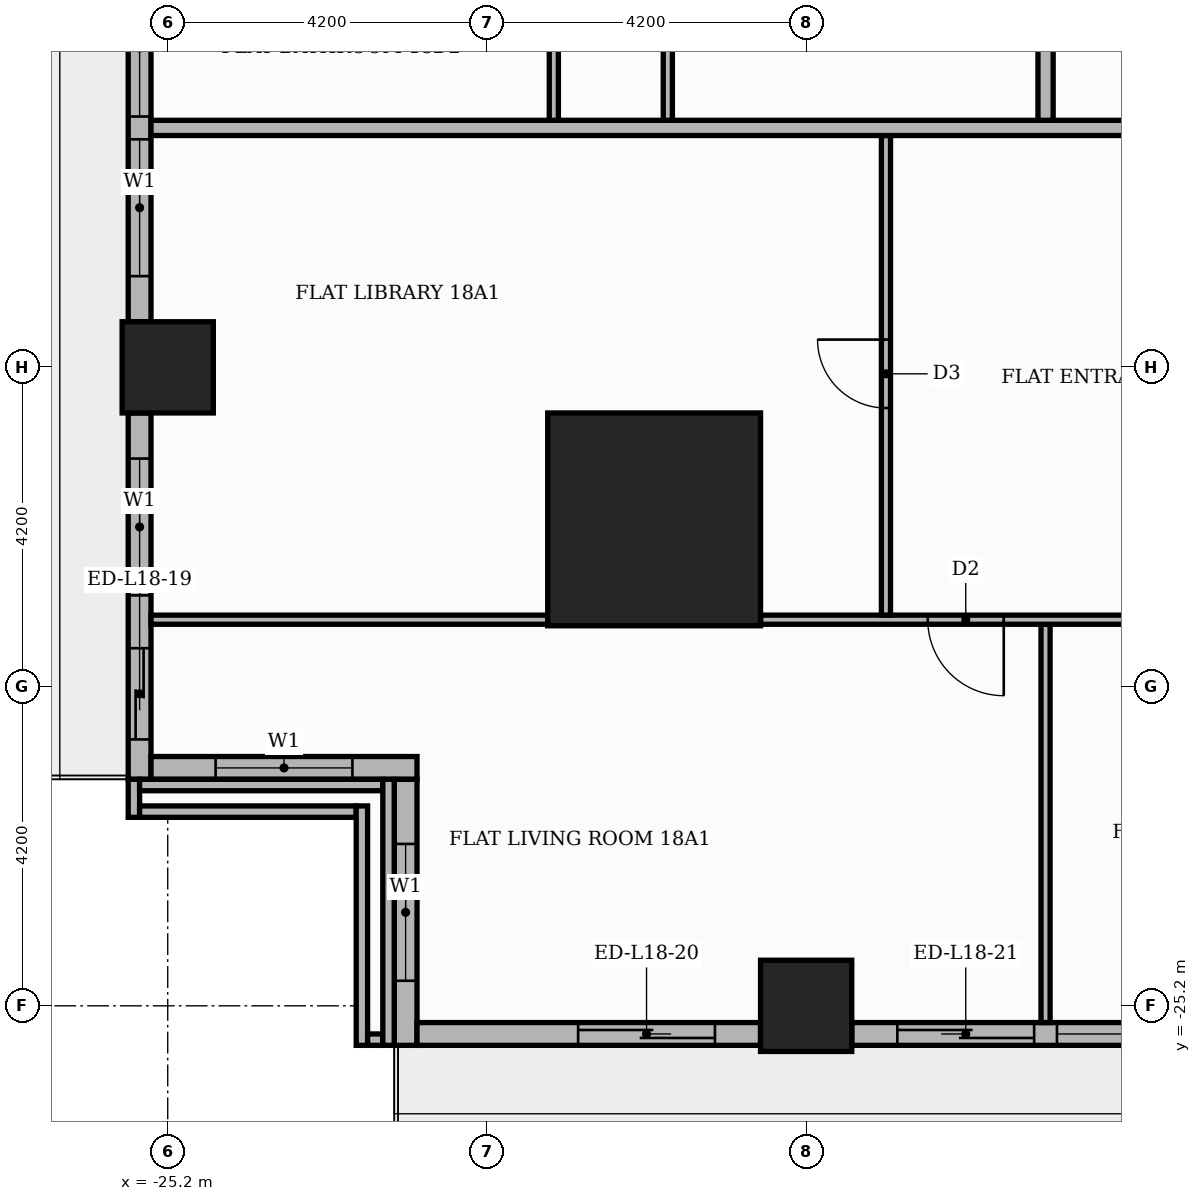
"""IFC4 building model, lengths in metres.
Left out: names, types, materials, properties, quantities, classifications, styles, units other than length and angle.
Written with IfcOpenShell. Run it as: python <this file> out.ifc"""

import sys

from ifc_helpers import new_model, si_unit, direction, frame, frame_2d, origin, origin_2d, place, context, subcontext, project, spatial, rectangle, extrude, element, fill, save


model = new_model("IFC4")
c1 = context("Model", 3, precision=1e-05, world=origin(), true_north=direction((0.0, 1.0)))
c2 = subcontext(c1, "Body", "Model", "MODEL_VIEW")
j1 = project(units=[si_unit("LENGTHUNIT", "METRE"), si_unit("PLANEANGLEUNIT", "RADIAN")], contexts=[c1])
p1 = place(None, origin())
s1 = spatial("IfcSite", under=j1, at=p1, CompositionType="ELEMENT")
p2 = place(p1, origin())
s2 = spatial("IfcBuilding", under=s1, at=p2, CompositionType="ELEMENT")
p3 = place(p2, frame((0.0, 0.0, 79.2)))
s3 = spatial("IfcBuildingStorey", under=s2, at=p3, CompositionType="ELEMENT", Elevation=79.2)
p4 = place(p3, frame((-18.8, -18.8, 0.0), z_axis=(0.0, 0.0, 1.0), x_axis=(1.0, 0.0, 0.0)))
e1 = element("IfcColumn", 1, at=p4, inside=s3, PredefinedType="COLUMN", context=c2, shape_type="SweptSolid", body=[
    extrude(rectangle(XDim=2.8, YDim=2.8, at=origin_2d()), origin(), (0.0, 0.0, 1.0), 3.9),
])
for number, where, z_axis, x_axis in (
    (2, (-16.8, -25.2, 0.0), (0.0, 0.0, 1.0), (1.0, 0.0, 0.0)),
    (3, (-25.2, -16.8, 0.0), (0.0, 0.0, 1.0), (1.0, 0.0, 0.0)),
):
    element("IfcColumn", number, at=place(p3, frame(where, z_axis=z_axis, x_axis=x_axis)), inside=s3, PredefinedType="COLUMN", context=c2, shape_type="SweptSolid", body=[
        extrude(rectangle(XDim=1.2, YDim=1.2, at=origin_2d()), origin(), (0.0, 0.0, 1.0), 3.9),
    ])
p5 = place(p3, frame((-25.57, -9.0, 0.0), z_axis=(0.0, 0.0, 1.0), x_axis=(0.0, -1.0, 0.0)))
e4 = element("IfcWall", 4, at=p5, inside=s3, PredefinedType="STANDARD", context=c2, shape_type="SweptSolid", body=[
    extrude(rectangle(XDim=7.2, YDim=0.3, at=frame_2d((3.6, 0.0))), origin(), (0.0, 0.0, 1.0), 3.48),
])
p6 = place(p5, frame((0.6, 0.0, 0.9)))
e5 = element("IfcOpeningElement", 5, at=p6, cuts=e4, PredefinedType="OPENING", context=c2, shape_type="SweptSolid", body=[
    extrude(rectangle(XDim=1.8, YDim=2.1, at=frame_2d((0.9, 1.05))), frame((0.0, 0.16, 0.0), z_axis=(0.0, -1.0, 0.0), x_axis=(1.0, 0.0, 0.0)), (0.0, 0.0, 1.0), 0.32),
])
p7 = place(p5, frame((2.7, 0.0, 0.9)))
e6 = element("IfcOpeningElement", 6, at=p7, cuts=e4, PredefinedType="OPENING", context=c2, shape_type="SweptSolid", body=[
    extrude(rectangle(XDim=1.8, YDim=2.1, at=frame_2d((0.9, 1.05))), frame((0.0, 0.16, 0.0), z_axis=(0.0, -1.0, 0.0), x_axis=(1.0, 0.0, 0.0)), (0.0, 0.0, 1.0), 0.32),
])
p8 = place(p5, frame((4.8, 0.0, 0.9)))
e7 = element("IfcOpeningElement", 7, at=p8, cuts=e4, PredefinedType="OPENING", context=c2, shape_type="SweptSolid", body=[
    extrude(rectangle(XDim=1.8, YDim=2.1, at=frame_2d((0.9, 1.05))), frame((0.0, 0.16, 0.0), z_axis=(0.0, -1.0, 0.0), x_axis=(1.0, 0.0, 0.0)), (0.0, 0.0, 1.0), 0.32),
])
p9 = place(p3, frame((-25.57, -17.4, 0.0), z_axis=(0.0, 0.0, 1.0), x_axis=(0.0, -1.0, 0.0)))
e8 = element("IfcWall", 8, at=p9, inside=s3, PredefinedType="STANDARD", context=c2, shape_type="SweptSolid", body=[
    extrude(rectangle(XDim=4.82, YDim=0.3, at=frame_2d((2.41, 0.0))), origin(), (0.0, 0.0, 1.0), 3.48),
])
p10 = place(p9, frame((0.6, 0.0, 0.9)))
e9 = element("IfcOpeningElement", 9, at=p10, cuts=e8, PredefinedType="OPENING", context=c2, shape_type="SweptSolid", body=[
    extrude(rectangle(XDim=1.8, YDim=2.1, at=frame_2d((0.9, 1.05))), frame((0.0, 0.16, 0.0), z_axis=(0.0, -1.0, 0.0), x_axis=(1.0, 0.0, 0.0)), (0.0, 0.0, 1.0), 0.32),
])
p11 = place(p9, frame((3.095, 0.0, 0.0)))
e10 = element("IfcOpeningElement", 10, at=p11, cuts=e8, PredefinedType="OPENING", context=c2, shape_type="SweptSolid", body=[
    extrude(rectangle(XDim=1.2, YDim=2.4, at=frame_2d((0.6, 1.2))), frame((0.0, 0.16, 0.0), z_axis=(0.0, -1.0, 0.0), x_axis=(1.0, 0.0, 0.0)), (0.0, 0.0, 1.0), 0.32),
])
p12 = place(p3, frame((-25.42, -22.07, 0.0), z_axis=(0.0, 0.0, 1.0), x_axis=(1.0, 0.0, 0.0)))
e11 = element("IfcWall", 11, at=p12, inside=s3, PredefinedType="STANDARD", context=c2, shape_type="SweptSolid", body=[
    extrude(rectangle(XDim=3.5, YDim=0.3, at=frame_2d((1.75, 0.0))), origin(), (0.0, 0.0, 1.0), 3.48),
])
p13 = place(p12, frame((0.85, 0.0, 0.9)))
e12 = element("IfcOpeningElement", 12, at=p13, cuts=e11, PredefinedType="OPENING", context=c2, shape_type="SweptSolid", body=[
    extrude(rectangle(XDim=1.8, YDim=2.1, at=frame_2d((0.9, 1.05))), frame((0.0, 0.16, 0.0), z_axis=(0.0, -1.0, 0.0), x_axis=(1.0, 0.0, 0.0)), (0.0, 0.0, 1.0), 0.32),
])
p14 = place(p3, frame((-22.07, -22.22, 0.0), z_axis=(0.0, 0.0, 1.0), x_axis=(0.0, -1.0, 0.0)))
e13 = element("IfcWall", 13, at=p14, inside=s3, PredefinedType="STANDARD", context=c2, shape_type="SweptSolid", body=[
    extrude(rectangle(XDim=3.5, YDim=0.3, at=frame_2d((1.75, 0.0))), origin(), (0.0, 0.0, 1.0), 3.48),
])
p15 = place(p14, frame((0.85, 0.0, 0.9)))
e14 = element("IfcOpeningElement", 14, at=p15, cuts=e13, PredefinedType="OPENING", context=c2, shape_type="SweptSolid", body=[
    extrude(rectangle(XDim=1.8, YDim=2.1, at=frame_2d((0.9, 1.05))), frame((0.0, 0.16, 0.0), z_axis=(0.0, -1.0, 0.0), x_axis=(1.0, 0.0, 0.0)), (0.0, 0.0, 1.0), 0.32),
])
p16 = place(p3, frame((-21.92, -25.57, 0.0), z_axis=(0.0, 0.0, 1.0), x_axis=(1.0, 0.0, 0.0)))
e15 = element("IfcWall", 15, at=p16, inside=s3, PredefinedType="STANDARD", context=c2, shape_type="SweptSolid", body=[
    extrude(rectangle(XDim=4.52, YDim=0.3, at=frame_2d((2.26, 0.0))), origin(), (0.0, 0.0, 1.0), 3.48),
])
p17 = place(p16, frame((2.12, 0.0, 0.0)))
e16 = element("IfcOpeningElement", 16, at=p17, cuts=e15, PredefinedType="OPENING", context=c2, shape_type="SweptSolid", body=[
    extrude(rectangle(XDim=1.8, YDim=2.4, at=frame_2d((0.9, 1.2))), frame((0.0, 0.16, 0.0), z_axis=(0.0, -1.0, 0.0), x_axis=(1.0, 0.0, 0.0)), (0.0, 0.0, 1.0), 0.32),
])
p18 = place(p3, frame((-16.2, -25.57, 0.0), z_axis=(0.0, 0.0, 1.0), x_axis=(1.0, 0.0, 0.0)))
e17 = element("IfcWall", 17, at=p18, inside=s3, PredefinedType="STANDARD", context=c2, shape_type="SweptSolid", body=[
    extrude(rectangle(XDim=7.2, YDim=0.3, at=frame_2d((3.6, 0.0))), origin(), (0.0, 0.0, 1.0), 3.48),
])
p19 = place(p18, frame((0.6, 0.0, 0.0)))
e18 = element("IfcOpeningElement", 18, at=p19, cuts=e17, PredefinedType="OPENING", context=c2, shape_type="SweptSolid", body=[
    extrude(rectangle(XDim=1.8, YDim=2.4, at=frame_2d((0.9, 1.2))), frame((0.0, 0.16, 0.0), z_axis=(0.0, -1.0, 0.0), x_axis=(1.0, 0.0, 0.0)), (0.0, 0.0, 1.0), 0.32),
])
p20 = place(p18, frame((2.7, 0.0, 0.9)))
e19 = element("IfcOpeningElement", 19, at=p20, cuts=e17, PredefinedType="OPENING", context=c2, shape_type="SweptSolid", body=[
    extrude(rectangle(XDim=3.9, YDim=2.1, at=frame_2d((1.95, 1.05))), frame((0.0, 0.16, 0.0), z_axis=(0.0, -1.0, 0.0), x_axis=(1.0, 0.0, 0.0)), (0.0, 0.0, 1.0), 0.32),
])
p21 = place(p3, frame((-25.645, -22.72, 0.0), z_axis=(0.0, 0.0, 1.0), x_axis=(0.0, 1.0, 0.0)))
e20 = element("IfcWall", 20, at=p21, inside=s3, PredefinedType="PARAPET", context=c2, shape_type="SweptSolid", body=[
    extrude(rectangle(XDim=0.5, YDim=0.15, at=frame_2d((0.25, 0.0))), origin(), (0.0, 0.0, 1.0), 1.1),
])
p22 = place(p3, frame((-25.57, -22.645, 0.0), z_axis=(0.0, 0.0, 1.0), x_axis=(1.0, 0.0, 0.0)))
e21 = element("IfcWall", 21, at=p22, inside=s3, PredefinedType="PARAPET", context=c2, shape_type="SweptSolid", body=[
    extrude(rectangle(XDim=2.85, YDim=0.15, at=frame_2d((1.425, 0.0))), origin(), (0.0, 0.0, 1.0), 1.1),
])
p23 = place(p3, frame((-25.57, -22.295, 0.0), z_axis=(0.0, 0.0, 1.0), x_axis=(1.0, 0.0, 0.0)))
e22 = element("IfcWall", 22, at=p23, inside=s3, PredefinedType="PARAPET", context=c2, shape_type="SweptSolid", body=[
    extrude(rectangle(XDim=3.2, YDim=0.15, at=frame_2d((1.6, 0.0))), origin(), (0.0, 0.0, 1.0), 1.1),
])
p24 = place(p3, frame((-22.645, -25.72, 0.0), z_axis=(0.0, 0.0, 1.0), x_axis=(0.0, 1.0, 0.0)))
e23 = element("IfcWall", 23, at=p24, inside=s3, PredefinedType="PARAPET", context=c2, shape_type="SweptSolid", body=[
    extrude(rectangle(XDim=3.15, YDim=0.15, at=frame_2d((1.575, 0.0))), origin(), (0.0, 0.0, 1.0), 1.1),
])
p25 = place(p3, frame((-22.57, -25.645, 0.0), z_axis=(0.0, 0.0, 1.0), x_axis=(1.0, 0.0, 0.0)))
e24 = element("IfcWall", 24, at=p25, inside=s3, PredefinedType="PARAPET", context=c2, shape_type="SweptSolid", body=[
    extrude(rectangle(XDim=0.2, YDim=0.15, at=frame_2d((0.1, 0.0))), origin(), (0.0, 0.0, 1.0), 1.1),
])
p26 = place(p3, frame((-22.295, -25.72, 0.0), z_axis=(0.0, 0.0, 1.0), x_axis=(0.0, 1.0, 0.0)))
e25 = element("IfcWall", 25, at=p26, inside=s3, PredefinedType="PARAPET", context=c2, shape_type="SweptSolid", body=[
    extrude(rectangle(XDim=3.5, YDim=0.15, at=frame_2d((1.75, 0.0))), origin(), (0.0, 0.0, 1.0), 1.1),
])
p27 = place(p3, frame((-13.65, -25.42, 0.0), z_axis=(0.0, 0.0, 1.0), x_axis=(0.0, 1.0, 0.0)))
e26 = element("IfcWall", 26, at=p27, inside=s3, PredefinedType="PARTITIONING", context=c2, shape_type="SweptSolid", body=[
    extrude(rectangle(XDim=5.24, YDim=0.12, at=frame_2d((2.62, 0.0))), origin(), (0.0, 0.0, 1.0), 3.48),
])
p28 = place(p3, frame((-25.42, -20.12, 0.0), z_axis=(0.0, 0.0, 1.0), x_axis=(1.0, 0.0, 0.0)))
e27 = element("IfcWall", 27, at=p28, inside=s3, PredefinedType="PARTITIONING", context=c2, shape_type="SweptSolid", body=[
    extrude(rectangle(XDim=5.22, YDim=0.12, at=frame_2d((2.61, 0.0))), origin(), (0.0, 0.0, 1.0), 3.48),
])
p29 = place(p3, frame((-17.4, -20.12, 0.0), z_axis=(0.0, 0.0, 1.0), x_axis=(1.0, 0.0, 0.0)))
e28 = element("IfcWall", 28, at=p29, inside=s3, PredefinedType="PARTITIONING", context=c2, shape_type="SweptSolid", body=[
    extrude(rectangle(XDim=30.95, YDim=0.12, at=frame_2d((15.475, 0.0))), origin(), (0.0, 0.0, 1.0), 3.48),
])
p30 = place(p29, frame((2.2, 0.0, 0.0)))
e29 = element("IfcOpeningElement", 29, at=p30, cuts=e28, PredefinedType="OPENING", context=c2, shape_type="SweptSolid", body=[
    extrude(rectangle(XDim=1.0, YDim=2.1, at=frame_2d((0.5, 1.05))), frame((0.0, 0.07, 0.0), z_axis=(0.0, -1.0, 0.0), x_axis=(1.0, 0.0, 0.0)), (0.0, 0.0, 1.0), 0.14),
])
p31 = place(p29, frame((5.4, 0.0, 0.0)))
e30 = element("IfcOpeningElement", 30, at=p31, cuts=e28, PredefinedType="OPENING", context=c2, shape_type="SweptSolid", body=[
    extrude(rectangle(XDim=0.9, YDim=2.1, at=frame_2d((0.45, 1.05))), frame((0.0, 0.07, 0.0), z_axis=(0.0, -1.0, 0.0), x_axis=(1.0, 0.0, 0.0)), (0.0, 0.0, 1.0), 0.14),
])
p32 = place(p29, frame((10.65, 0.0, 0.0)))
e31 = element("IfcOpeningElement", 31, at=p32, cuts=e28, PredefinedType="OPENING", context=c2, shape_type="SweptSolid", body=[
    extrude(rectangle(XDim=0.9, YDim=2.1, at=frame_2d((0.45, 1.05))), frame((0.0, 0.07, 0.0), z_axis=(0.0, -1.0, 0.0), x_axis=(1.0, 0.0, 0.0)), (0.0, 0.0, 1.0), 0.14),
])
p33 = place(p29, frame((20.1, 0.0, 0.0)))
e32 = element("IfcOpeningElement", 32, at=p33, cuts=e28, PredefinedType="OPENING", context=c2, shape_type="SweptSolid", body=[
    extrude(rectangle(XDim=0.9, YDim=2.1, at=frame_2d((0.45, 1.05))), frame((0.0, 0.07, 0.0), z_axis=(0.0, -1.0, 0.0), x_axis=(1.0, 0.0, 0.0)), (0.0, 0.0, 1.0), 0.14),
])
p34 = place(p29, frame((26.4, 0.0, 0.0)))
e33 = element("IfcOpeningElement", 33, at=p34, cuts=e28, PredefinedType="OPENING", context=c2, shape_type="SweptSolid", body=[
    extrude(rectangle(XDim=0.9, YDim=2.1, at=frame_2d((0.45, 1.05))), frame((0.0, 0.07, 0.0), z_axis=(0.0, -1.0, 0.0), x_axis=(1.0, 0.0, 0.0)), (0.0, 0.0, 1.0), 0.14),
])
p35 = place(p3, frame((-15.75, -20.06, 0.0), z_axis=(0.0, 0.0, 1.0), x_axis=(0.0, 1.0, 0.0)))
e34 = element("IfcWall", 34, at=p35, inside=s3, PredefinedType="PARTITIONING", context=c2, shape_type="SweptSolid", body=[
    extrude(rectangle(XDim=6.31, YDim=0.12, at=frame_2d((3.155, 0.0))), origin(), (0.0, 0.0, 1.0), 3.48),
])
p36 = place(p35, frame((2.725, 0.0, 0.0)))
e35 = element("IfcOpeningElement", 35, at=p36, cuts=e34, PredefinedType="OPENING", context=c2, shape_type="SweptSolid", body=[
    extrude(rectangle(XDim=0.9, YDim=2.1, at=frame_2d((0.45, 1.05))), frame((0.0, 0.07, 0.0), z_axis=(0.0, -1.0, 0.0), x_axis=(1.0, 0.0, 0.0)), (0.0, 0.0, 1.0), 0.14),
])
p37 = place(p3, frame((-25.42, -13.65, 0.0), z_axis=(0.0, 0.0, 1.0), x_axis=(1.0, 0.0, 0.0)))
e36 = element("IfcWall", 36, at=p37, inside=s3, PredefinedType="PARTITIONING", context=c2, shape_type="SweptSolid", body=[
    extrude(rectangle(XDim=39.07, YDim=0.2, at=frame_2d((19.535, 0.0))), origin(), (0.0, 0.0, 1.0), 3.48),
])
p38 = place(p37, frame((13.32, 0.0, 0.0)))
e37 = element("IfcOpeningElement", 37, at=p38, cuts=e36, PredefinedType="OPENING", context=c2, shape_type="SweptSolid", body=[
    extrude(rectangle(XDim=1.1, YDim=2.4, at=frame_2d((0.55, 1.2))), frame((0.0, 0.11, 0.0), z_axis=(0.0, -1.0, 0.0), x_axis=(1.0, 0.0, 0.0)), (0.0, 0.0, 1.0), 0.22),
])
p39 = place(p3, frame((-20.12, -13.55, 0.0), z_axis=(0.0, 0.0, 1.0), x_axis=(0.0, 1.0, 0.0)))
e38 = element("IfcWall", 38, at=p39, inside=s3, PredefinedType="PARTITIONING", context=c2, shape_type="SweptSolid", body=[
    extrude(rectangle(XDim=1.94, YDim=0.12, at=frame_2d((0.97, 0.0))), origin(), (0.0, 0.0, 1.0), 3.48),
])
p40 = place(p3, frame((-18.62, -13.55, 0.0), z_axis=(0.0, 0.0, 1.0), x_axis=(0.0, 1.0, 0.0)))
e39 = element("IfcWall", 39, at=p40, inside=s3, PredefinedType="PARTITIONING", context=c2, shape_type="SweptSolid", body=[
    extrude(rectangle(XDim=3.44, YDim=0.12, at=frame_2d((1.72, 0.0))), origin(), (0.0, 0.0, 1.0), 3.48),
])
p41 = place(p40, frame((1.2, 0.0, 0.0)))
e40 = element("IfcOpeningElement", 40, at=p41, cuts=e39, PredefinedType="OPENING", context=c2, shape_type="SweptSolid", body=[
    extrude(rectangle(XDim=1.0, YDim=2.1, at=frame_2d((0.5, 1.05))), frame((0.0, 0.07, 0.0), z_axis=(0.0, -1.0, 0.0), x_axis=(1.0, 0.0, 0.0)), (0.0, 0.0, 1.0), 0.14),
])
p42 = place(p3, frame((-13.65, -13.55, 0.0), z_axis=(0.0, 0.0, 1.0), x_axis=(0.0, 1.0, 0.0)))
e41 = element("IfcWall", 41, at=p42, inside=s3, PredefinedType="PARTITIONING", context=c2, shape_type="SweptSolid", body=[
    extrude(rectangle(XDim=18.7, YDim=0.2, at=frame_2d((9.35, 0.0))), origin(), (0.0, 0.0, 1.0), 3.48),
])
p43 = place(p42, frame((14.05, 0.0, 0.0)))
e42 = element("IfcOpeningElement", 42, at=p43, cuts=e41, PredefinedType="OPENING", context=c2, shape_type="SweptSolid", body=[
    extrude(rectangle(XDim=1.1, YDim=2.4, at=frame_2d((0.55, 1.2))), frame((0.0, 0.11, 0.0), z_axis=(0.0, -1.0, 0.0), x_axis=(1.0, 0.0, 0.0)), (0.0, 0.0, 1.0), 0.22),
])
p44 = place(p7, origin())
e43 = element("IfcWindow", 43, at=p44, inside=s3, PartitioningType="SINGLE_PANEL", PredefinedType="WINDOW", context=c2, shape_type="SweptSolid", body=[
    extrude(rectangle(XDim=1.8, YDim=2.1, at=frame_2d((0.9, 1.05))), frame((0.0, 0.03, 0.0), z_axis=(0.0, -1.0, 0.0), x_axis=(1.0, 0.0, 0.0)), (0.0, 0.0, 1.0), 0.06),
])
fill(e6, e43)
p45 = place(p8, origin())
e44 = element("IfcWindow", 44, at=p45, inside=s3, PartitioningType="SINGLE_PANEL", PredefinedType="WINDOW", context=c2, shape_type="SweptSolid", body=[
    extrude(rectangle(XDim=1.8, YDim=2.1, at=frame_2d((0.9, 1.05))), frame((0.0, 0.03, 0.0), z_axis=(0.0, -1.0, 0.0), x_axis=(1.0, 0.0, 0.0)), (0.0, 0.0, 1.0), 0.06),
])
fill(e7, e44)
p46 = place(p10, origin())
e45 = element("IfcWindow", 45, at=p46, inside=s3, PartitioningType="SINGLE_PANEL", PredefinedType="WINDOW", context=c2, shape_type="SweptSolid", body=[
    extrude(rectangle(XDim=1.8, YDim=2.1, at=frame_2d((0.9, 1.05))), frame((0.0, 0.03, 0.0), z_axis=(0.0, -1.0, 0.0), x_axis=(1.0, 0.0, 0.0)), (0.0, 0.0, 1.0), 0.06),
])
fill(e9, e45)
p47 = place(p11, origin())
e46 = element("IfcDoor", 46, at=p47, inside=s3, OperationType="SLIDING_TO_RIGHT", PredefinedType="DOOR", context=c2, shape_type="SweptSolid", body=[
    extrude(rectangle(XDim=1.2, YDim=2.4, at=frame_2d((0.6, 1.2))), frame((0.0, 0.025, 0.0), z_axis=(0.0, -1.0, 0.0), x_axis=(1.0, 0.0, 0.0)), (0.0, 0.0, 1.0), 0.05),
])
fill(e10, e46)
p48 = place(p13, origin())
e47 = element("IfcWindow", 47, at=p48, inside=s3, PartitioningType="SINGLE_PANEL", PredefinedType="WINDOW", context=c2, shape_type="SweptSolid", body=[
    extrude(rectangle(XDim=1.8, YDim=2.1, at=frame_2d((0.9, 1.05))), frame((0.0, 0.03, 0.0), z_axis=(0.0, -1.0, 0.0), x_axis=(1.0, 0.0, 0.0)), (0.0, 0.0, 1.0), 0.06),
])
fill(e12, e47)
p49 = place(p15, origin())
e48 = element("IfcWindow", 48, at=p49, inside=s3, PartitioningType="SINGLE_PANEL", PredefinedType="WINDOW", context=c2, shape_type="SweptSolid", body=[
    extrude(rectangle(XDim=1.8, YDim=2.1, at=frame_2d((0.9, 1.05))), frame((0.0, 0.03, 0.0), z_axis=(0.0, -1.0, 0.0), x_axis=(1.0, 0.0, 0.0)), (0.0, 0.0, 1.0), 0.06),
])
fill(e14, e48)
p50 = place(p17, origin())
e49 = element("IfcDoor", 49, at=p50, inside=s3, OperationType="SLIDING_TO_RIGHT", PredefinedType="DOOR", context=c2, shape_type="SweptSolid", body=[
    extrude(rectangle(XDim=1.8, YDim=2.4, at=frame_2d((0.9, 1.2))), frame((0.0, 0.025, 0.0), z_axis=(0.0, -1.0, 0.0), x_axis=(1.0, 0.0, 0.0)), (0.0, 0.0, 1.0), 0.05),
])
fill(e16, e49)
p51 = place(p19, origin())
e50 = element("IfcDoor", 50, at=p51, inside=s3, OperationType="SLIDING_TO_LEFT", PredefinedType="DOOR", context=c2, shape_type="SweptSolid", body=[
    extrude(rectangle(XDim=1.8, YDim=2.4, at=frame_2d((0.9, 1.2))), frame((0.0, 0.025, 0.0), z_axis=(0.0, -1.0, 0.0), x_axis=(1.0, 0.0, 0.0)), (0.0, 0.0, 1.0), 0.05),
])
fill(e18, e50)
p52 = place(p20, origin())
e51 = element("IfcWindow", 51, at=p52, inside=s3, PartitioningType="SINGLE_PANEL", PredefinedType="WINDOW", context=c2, shape_type="SweptSolid", body=[
    extrude(rectangle(XDim=3.9, YDim=2.1, at=frame_2d((1.95, 1.05))), frame((0.0, 0.03, 0.0), z_axis=(0.0, -1.0, 0.0), x_axis=(1.0, 0.0, 0.0)), (0.0, 0.0, 1.0), 0.06),
])
fill(e19, e51)
p53 = place(p36, origin())
e52 = element("IfcDoor", 52, at=p53, inside=s3, OperationType="SINGLE_SWING_RIGHT", PredefinedType="DOOR", context=c2, shape_type="SweptSolid", body=[
    extrude(rectangle(XDim=0.9, YDim=2.1, at=frame_2d((0.45, 1.05))), frame((0.0, 0.025, 0.0), z_axis=(0.0, -1.0, 0.0), x_axis=(1.0, 0.0, 0.0)), (0.0, 0.0, 1.0), 0.05),
])
fill(e35, e52)
p54 = place(p30, frame((1.0, 0.0, 0.0), z_axis=(0.0, 0.0, 1.0), x_axis=(-1.0, 0.0, 0.0)))
e53 = element("IfcDoor", 53, at=p54, inside=s3, OperationType="SINGLE_SWING_RIGHT", PredefinedType="DOOR", context=c2, shape_type="SweptSolid", body=[
    extrude(rectangle(XDim=1.0, YDim=2.1, at=frame_2d((0.5, 1.05))), frame((0.0, 0.025, 0.0), z_axis=(0.0, -1.0, 0.0), x_axis=(1.0, 0.0, 0.0)), (0.0, 0.0, 1.0), 0.05),
])
fill(e29, e53)
save(model, sys.argv[1])
